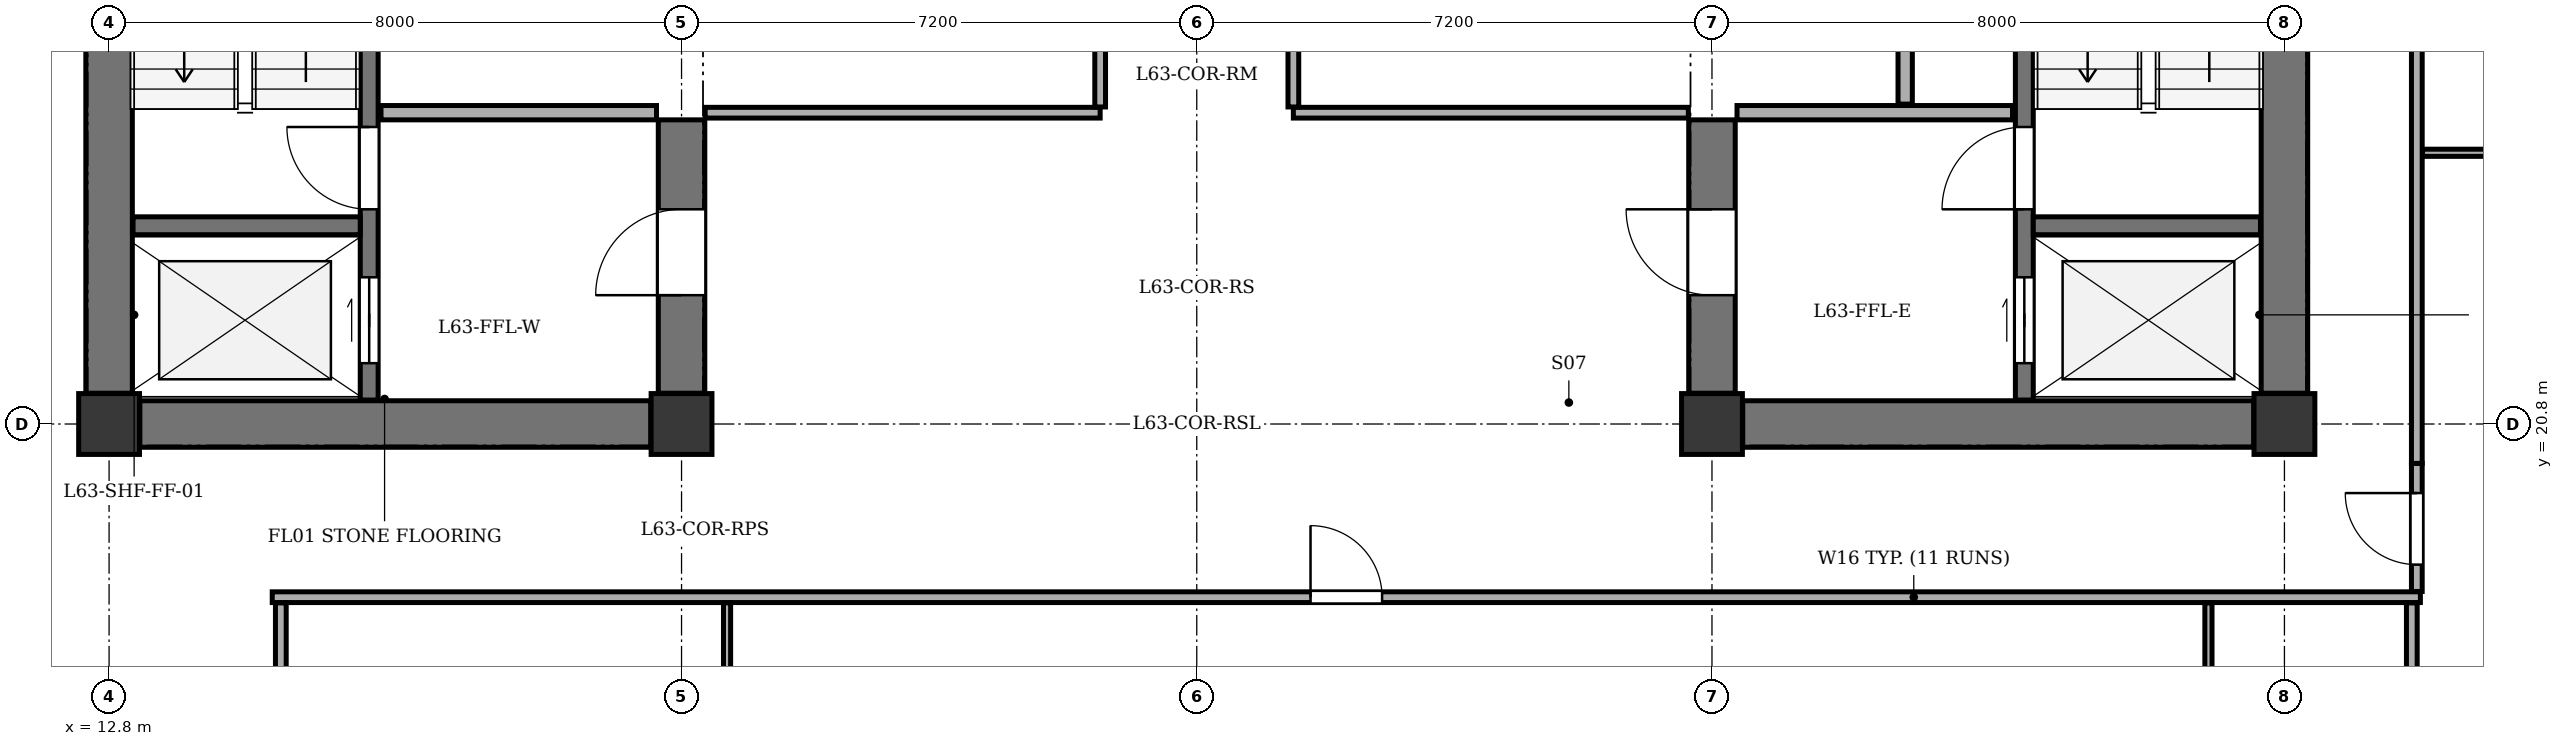
"""IFC4 building model, lengths in metres.
Left out: names, types, materials, properties, quantities, classifications, styles, units other than length and angle.
Written with IfcOpenShell. Run it as: python <this file> out.ifc"""

import sys

from ifc_helpers import new_model, si_unit, direction, frame, frame_2d, origin, origin_2d, place, context, subcontext, project, spatial, rectangle, extrude, element, fill, save


model = new_model("IFC4")
c1 = context("Model", 3, precision=1e-05, world=origin(), true_north=direction((0.0, 1.0)))
c2 = subcontext(c1, "Body", "Model", "MODEL_VIEW")
j1 = project(units=[si_unit("LENGTHUNIT", "METRE"), si_unit("PLANEANGLEUNIT", "RADIAN")], contexts=[c1])
p1 = place(None, origin())
s1 = spatial("IfcSite", under=j1, at=p1, CompositionType="ELEMENT")
p2 = place(p1, origin())
s2 = spatial("IfcBuilding", under=s1, at=p2, CompositionType="ELEMENT")
p3 = place(p2, frame((0.0, 0.0, 241.5)))
s3 = spatial("IfcBuildingStorey", under=s2, at=p3, CompositionType="ELEMENT", Elevation=241.5)
for number, where, z_axis, x_axis in (
    (1, (12.8, 20.8, 0.0), (0.0, 0.0, 1.0), (1.0, 0.0, 0.0)),
    (2, (20.8, 20.8, 0.0), (0.0, 0.0, 1.0), (1.0, 0.0, 0.0)),
    (3, (35.2, 20.8, 0.0), (0.0, 0.0, 1.0), (1.0, 0.0, 0.0)),
    (4, (43.2, 20.8, 0.0), (0.0, 0.0, 1.0), (1.0, 0.0, 0.0)),
):
    element("IfcColumn", number, at=place(p3, frame(where, z_axis=z_axis, x_axis=x_axis)), inside=s3, PredefinedType="COLUMN", context=c2, shape_type="SweptSolid", body=[
        extrude(rectangle(XDim=0.85, YDim=0.85, at=origin_2d()), origin(), (0.0, 0.0, 1.0), 3.4),
    ])
p4 = place(p3, frame((12.8, 21.23, 0.0), z_axis=(0.0, 0.0, 1.0), x_axis=(0.0, 1.0, 0.0)))
e5 = element("IfcWall", 5, at=p4, inside=s3, PredefinedType="SHEAR", context=c2, shape_type="SweptSolid", body=[
    extrude(rectangle(XDim=11.94, YDim=0.65, at=frame_2d((5.97, 0.0))), origin(), (0.0, 0.0, 1.0), 3.1),
])
p5 = place(p3, frame((13.23, 20.8, 0.0), z_axis=(0.0, 0.0, 1.0), x_axis=(1.0, 0.0, 0.0)))
e6 = element("IfcWall", 6, at=p5, inside=s3, PredefinedType="SHEAR", context=c2, shape_type="SweptSolid", body=[
    extrude(rectangle(XDim=7.14, YDim=0.65, at=frame_2d((3.57, 0.0))), origin(), (0.0, 0.0, 1.0), 3.1),
])
p6 = place(p3, frame((20.8, 21.23, 0.0), z_axis=(0.0, 0.0, 1.0), x_axis=(0.0, 1.0, 0.0)))
e7 = element("IfcWall", 7, at=p6, inside=s3, PredefinedType="SHEAR", context=c2, shape_type="SweptSolid", body=[
    extrude(rectangle(XDim=3.82, YDim=0.65, at=frame_2d((1.91, 0.0))), origin(), (0.0, 0.0, 1.0), 3.1),
])
p7 = place(p6, frame((1.37, 0.0, 0.0)))
e8 = element("IfcOpeningElement", 8, at=p7, cuts=e7, PredefinedType="OPENING", context=c2, shape_type="SweptSolid", body=[
    extrude(rectangle(XDim=1.2, YDim=2.15, at=frame_2d((0.6, 1.075))), frame((0.0, 0.335, 0.0), z_axis=(0.0, -1.0, 0.0), x_axis=(1.0, 0.0, 0.0)), (0.0, 0.0, 1.0), 0.67),
])
p8 = place(p3, frame((16.435, 21.135, 0.0), z_axis=(0.0, 0.0, 1.0), x_axis=(0.0, 1.0, 0.0)))
e9 = element("IfcWall", 9, at=p8, inside=s3, PredefinedType="SHEAR", context=c2, shape_type="SweptSolid", body=[
    extrude(rectangle(XDim=12.13, YDim=0.25, at=frame_2d((6.065, 0.0))), origin(), (0.0, 0.0, 1.0), 3.1),
])
p9 = place(p8, frame((0.515, 0.0, 0.0)))
e10 = element("IfcOpeningElement", 10, at=p9, cuts=e9, PredefinedType="OPENING", context=c2, shape_type="SweptSolid", body=[
    extrude(rectangle(XDim=1.2, YDim=2.15, at=frame_2d((0.6, 1.075))), frame((0.0, 0.135, 0.0), z_axis=(0.0, -1.0, 0.0), x_axis=(1.0, 0.0, 0.0)), (0.0, 0.0, 1.0), 0.27),
])
p10 = place(p8, frame((2.665, 0.0, 0.0)))
e11 = element("IfcOpeningElement", 11, at=p10, cuts=e9, PredefinedType="OPENING", context=c2, shape_type="SweptSolid", body=[
    extrude(rectangle(XDim=1.15, YDim=2.15, at=frame_2d((0.575, 1.075))), frame((0.0, 0.135, 0.0), z_axis=(0.0, -1.0, 0.0), x_axis=(1.0, 0.0, 0.0)), (0.0, 0.0, 1.0), 0.27),
])
p11 = place(p3, frame((13.135, 23.57, 0.0), z_axis=(0.0, 0.0, 1.0), x_axis=(1.0, 0.0, 0.0)))
e12 = element("IfcWall", 12, at=p11, inside=s3, PredefinedType="SHEAR", context=c2, shape_type="SweptSolid", body=[
    extrude(rectangle(XDim=3.175, YDim=0.25, at=frame_2d((1.587, 0.0))), origin(), (0.0, 0.0, 1.0), 3.1),
])
p12 = place(p3, frame((16.6, 25.15, 0.0), z_axis=(0.0, 0.0, 1.0), x_axis=(1.0, 0.0, 0.0)))
e13 = element("IfcWall", 13, at=p12, inside=s3, PredefinedType="SOLIDWALL", context=c2, shape_type="SweptSolid", body=[
    extrude(rectangle(XDim=3.85, YDim=0.2, at=frame_2d((1.925, 0.0))), origin(), (0.0, 0.0, 1.0), 3.1),
])
p13 = place(p3, frame((43.2, 21.23, 0.0), z_axis=(0.0, 0.0, 1.0), x_axis=(0.0, 1.0, 0.0)))
e14 = element("IfcWall", 14, at=p13, inside=s3, PredefinedType="SHEAR", context=c2, shape_type="SweptSolid", body=[
    extrude(rectangle(XDim=11.94, YDim=0.65, at=frame_2d((5.97, 0.0))), origin(), (0.0, 0.0, 1.0), 3.1),
])
p14 = place(p3, frame((35.63, 20.8, 0.0), z_axis=(0.0, 0.0, 1.0), x_axis=(1.0, 0.0, 0.0)))
e15 = element("IfcWall", 15, at=p14, inside=s3, PredefinedType="SHEAR", context=c2, shape_type="SweptSolid", body=[
    extrude(rectangle(XDim=7.14, YDim=0.65, at=frame_2d((3.57, 0.0))), origin(), (0.0, 0.0, 1.0), 3.1),
])
p15 = place(p3, frame((35.2, 21.23, 0.0), z_axis=(0.0, 0.0, 1.0), x_axis=(0.0, 1.0, 0.0)))
e16 = element("IfcWall", 16, at=p15, inside=s3, PredefinedType="SHEAR", context=c2, shape_type="SweptSolid", body=[
    extrude(rectangle(XDim=3.82, YDim=0.65, at=frame_2d((1.91, 0.0))), origin(), (0.0, 0.0, 1.0), 3.1),
])
p16 = place(p15, frame((1.37, 0.0, 0.0)))
e17 = element("IfcOpeningElement", 17, at=p16, cuts=e16, PredefinedType="OPENING", context=c2, shape_type="SweptSolid", body=[
    extrude(rectangle(XDim=1.2, YDim=2.15, at=frame_2d((0.6, 1.075))), frame((0.0, 0.335, 0.0), z_axis=(0.0, -1.0, 0.0), x_axis=(1.0, 0.0, 0.0)), (0.0, 0.0, 1.0), 0.67),
])
p17 = place(p3, frame((39.565, 21.135, 0.0), z_axis=(0.0, 0.0, 1.0), x_axis=(0.0, 1.0, 0.0)))
e18 = element("IfcWall", 18, at=p17, inside=s3, PredefinedType="SHEAR", context=c2, shape_type="SweptSolid", body=[
    extrude(rectangle(XDim=12.13, YDim=0.25, at=frame_2d((6.065, 0.0))), origin(), (0.0, 0.0, 1.0), 3.1),
])
p18 = place(p17, frame((0.515, 0.0, 0.0)))
e19 = element("IfcOpeningElement", 19, at=p18, cuts=e18, PredefinedType="OPENING", context=c2, shape_type="SweptSolid", body=[
    extrude(rectangle(XDim=1.2, YDim=2.15, at=frame_2d((0.6, 1.075))), frame((0.0, 0.135, 0.0), z_axis=(0.0, -1.0, 0.0), x_axis=(1.0, 0.0, 0.0)), (0.0, 0.0, 1.0), 0.27),
])
p19 = place(p17, frame((2.665, 0.0, 0.0)))
e20 = element("IfcOpeningElement", 20, at=p19, cuts=e18, PredefinedType="OPENING", context=c2, shape_type="SweptSolid", body=[
    extrude(rectangle(XDim=1.15, YDim=2.15, at=frame_2d((0.575, 1.075))), frame((0.0, 0.135, 0.0), z_axis=(0.0, -1.0, 0.0), x_axis=(1.0, 0.0, 0.0)), (0.0, 0.0, 1.0), 0.27),
])
p20 = place(p3, frame((39.69, 23.57, 0.0), z_axis=(0.0, 0.0, 1.0), x_axis=(1.0, 0.0, 0.0)))
e21 = element("IfcWall", 21, at=p20, inside=s3, PredefinedType="SHEAR", context=c2, shape_type="SweptSolid", body=[
    extrude(rectangle(XDim=3.175, YDim=0.25, at=frame_2d((1.587, 0.0))), origin(), (0.0, 0.0, 1.0), 3.1),
])
p21 = place(p3, frame((35.55, 25.15, 0.0), z_axis=(0.0, 0.0, 1.0), x_axis=(1.0, 0.0, 0.0)))
e22 = element("IfcWall", 22, at=p21, inside=s3, PredefinedType="SOLIDWALL", context=c2, shape_type="SweptSolid", body=[
    extrude(rectangle(XDim=3.85, YDim=0.2, at=frame_2d((1.925, 0.0))), origin(), (0.0, 0.0, 1.0), 3.1),
])
p22 = place(p3, frame((37.9, 25.27, 0.0), z_axis=(0.0, 0.0, 1.0), x_axis=(0.0, 1.0, 0.0)))
e23 = element("IfcWall", 23, at=p22, inside=s3, PredefinedType="SOLIDWALL", context=c2, shape_type="SweptSolid", body=[
    extrude(rectangle(XDim=7.995, YDim=0.2, at=frame_2d((3.998, 0.0))), origin(), (0.0, 0.0, 1.0), 3.1),
])
for number, where, z_axis, x_axis in (
    (24, (21.13, 25.15, 0.0), (0.0, 0.0, 1.0), (1.0, 0.0, 0.0)),
    (25, (29.35, 25.15, 0.0), (0.0, 0.0, 1.0), (1.0, 0.0, 0.0)),
):
    element("IfcWall", number, at=place(p3, frame(where, z_axis=z_axis, x_axis=x_axis)), inside=s3, PredefinedType="PARTITIONING", context=c2, shape_type="SweptSolid", body=[
        extrude(rectangle(XDim=5.52, YDim=0.15, at=frame_2d((2.76, 0.0))), origin(), (0.0, 0.0, 1.0), 3.1),
    ])
p23 = place(p3, frame((26.65, 25.23, 0.0), z_axis=(0.0, 0.0, 1.0), x_axis=(0.0, 1.0, 0.0)))
e26 = element("IfcWall", 26, at=p23, inside=s3, PredefinedType="PARTITIONING", context=c2, shape_type="SweptSolid", body=[
    extrude(rectangle(XDim=5.82, YDim=0.15, at=frame_2d((2.91, 0.0))), origin(), (0.0, 0.0, 1.0), 3.1),
])
p24 = place(p23, frame((2.72, 0.0, 0.0)))
e27 = element("IfcOpeningElement", 27, at=p24, cuts=e26, PredefinedType="OPENING", context=c2, shape_type="SweptSolid", body=[
    extrude(rectangle(XDim=1.0, YDim=2.1, at=frame_2d((0.5, 1.05))), frame((0.0, 0.085, 0.0), z_axis=(0.0, -1.0, 0.0), x_axis=(1.0, 0.0, 0.0)), (0.0, 0.0, 1.0), 0.17),
])
p25 = place(p3, frame((29.35, 25.23, 0.0), z_axis=(0.0, 0.0, 1.0), x_axis=(0.0, 1.0, 0.0)))
e28 = element("IfcWall", 28, at=p25, inside=s3, PredefinedType="PARTITIONING", context=c2, shape_type="SweptSolid", body=[
    extrude(rectangle(XDim=5.82, YDim=0.15, at=frame_2d((2.91, 0.0))), origin(), (0.0, 0.0, 1.0), 3.1),
])
p26 = place(p25, frame((2.72, 0.0, 0.0)))
e29 = element("IfcOpeningElement", 29, at=p26, cuts=e28, PredefinedType="OPENING", context=c2, shape_type="SweptSolid", body=[
    extrude(rectangle(XDim=1.0, YDim=2.1, at=frame_2d((0.5, 1.05))), frame((0.0, 0.085, 0.0), z_axis=(0.0, -1.0, 0.0), x_axis=(1.0, 0.0, 0.0)), (0.0, 0.0, 1.0), 0.17),
])
p27 = place(p3, frame((15.08, 18.38, 0.0), z_axis=(0.0, 0.0, 1.0), x_axis=(1.0, 0.0, 0.0)))
e30 = element("IfcWall", 30, at=p27, inside=s3, PredefinedType="PARTITIONING", context=c2, shape_type="SweptSolid", body=[
    extrude(rectangle(XDim=30.02, YDim=0.15, at=frame_2d((15.01, 0.0))), origin(), (0.0, 0.0, 1.0), 3.1),
])
p28 = place(p27, frame((14.51, 0.0, 0.0)))
e31 = element("IfcOpeningElement", 31, at=p28, cuts=e30, PredefinedType="OPENING", context=c2, shape_type="SweptSolid", body=[
    extrude(rectangle(XDim=1.0, YDim=2.1, at=frame_2d((0.5, 1.05))), frame((0.0, 0.085, 0.0), z_axis=(0.0, -1.0, 0.0), x_axis=(1.0, 0.0, 0.0)), (0.0, 0.0, 1.0), 0.17),
])
p29 = place(p3, frame((15.2, 3.045, 0.0), z_axis=(0.0, 0.0, 1.0), x_axis=(0.0, 1.0, 0.0)))
e32 = element("IfcWall", 32, at=p29, inside=s3, PredefinedType="PARTITIONING", context=c2, shape_type="SweptSolid", body=[
    extrude(rectangle(XDim=15.255, YDim=0.15, at=frame_2d((7.627, 0.0))), origin(), (0.0, 0.0, 1.0), 3.1),
])
p30 = place(p3, frame((42.138, 5.605, 0.0), z_axis=(0.0, 0.0, 1.0), x_axis=(0.0, 1.0, 0.0)))
e33 = element("IfcWall", 33, at=p30, inside=s3, PredefinedType="PARTITIONING", context=c2, shape_type="SweptSolid", body=[
    extrude(rectangle(XDim=12.695, YDim=0.1, at=frame_2d((6.348, 0.0))), origin(), (0.0, 0.0, 1.0), 2.725),
])
p31 = place(p30, frame((5.91, 0.0, 0.0)))
e34 = element("IfcOpeningElement", 34, at=p31, cuts=e33, PredefinedType="OPENING", context=c2, shape_type="SweptSolid", body=[
    extrude(rectangle(XDim=0.9, YDim=2.05, at=frame_2d((0.45, 1.025))), frame((0.0, 0.06, 0.0), z_axis=(0.0, -1.0, 0.0), x_axis=(1.0, 0.0, 0.0)), (0.0, 0.0, 1.0), 0.12),
])
p32 = place(p3, frame((21.436, 5.605, 0.0), z_axis=(0.0, 0.0, 1.0), x_axis=(0.0, 1.0, 0.0)))
e35 = element("IfcWall", 35, at=p32, inside=s3, PredefinedType="PARTITIONING", context=c2, shape_type="SweptSolid", body=[
    extrude(rectangle(XDim=12.695, YDim=0.1, at=frame_2d((6.348, 0.0))), origin(), (0.0, 0.0, 1.0), 3.1),
])
p33 = place(p32, frame((0.605, 0.0, 0.0)))
e36 = element("IfcOpeningElement", 36, at=p33, cuts=e35, PredefinedType="OPENING", context=c2, shape_type="SweptSolid", body=[
    extrude(rectangle(XDim=0.9, YDim=2.05, at=frame_2d((0.45, 1.025))), frame((0.0, 0.06, 0.0), z_axis=(0.0, -1.0, 0.0), x_axis=(1.0, 0.0, 0.0)), (0.0, 0.0, 1.0), 0.12),
])
p34 = place(p3, frame((44.98, 3.045, 0.0), z_axis=(0.0, 0.0, 1.0), x_axis=(0.0, 1.0, 0.0)))
e37 = element("IfcWall", 37, at=p34, inside=s3, PredefinedType="PARTITIONING", context=c2, shape_type="SweptSolid", body=[
    extrude(rectangle(XDim=15.255, YDim=0.15, at=frame_2d((7.627, 0.0))), origin(), (0.0, 0.0, 1.0), 2.725),
])
p35 = place(p3, frame((45.05, 18.46, 0.0), z_axis=(0.0, 0.0, 1.0), x_axis=(0.0, 1.0, 0.0)))
e38 = element("IfcWall", 38, at=p35, inside=s3, PredefinedType="PARTITIONING", context=c2, shape_type="SweptSolid", body=[
    extrude(rectangle(XDim=1.79, YDim=0.15, at=frame_2d((0.895, 0.0))), origin(), (0.0, 0.0, 1.0), 2.725),
])
p36 = place(p35, frame((0.375, 0.0, 0.0)))
e39 = element("IfcOpeningElement", 39, at=p36, cuts=e38, PredefinedType="OPENING", context=c2, shape_type="SweptSolid", body=[
    extrude(rectangle(XDim=1.0, YDim=2.1, at=frame_2d((0.5, 1.05))), frame((0.0, 0.085, 0.0), z_axis=(0.0, -1.0, 0.0), x_axis=(1.0, 0.0, 0.0)), (0.0, 0.0, 1.0), 0.17),
])
p37 = place(p3, frame((45.05, 20.25, 0.0), z_axis=(0.0, 0.0, 1.0), x_axis=(0.0, 1.0, 0.0)))
e40 = element("IfcWall", 40, at=p37, inside=s3, PredefinedType="PARTITIONING", context=c2, shape_type="SweptSolid", body=[
    extrude(rectangle(XDim=13.9, YDim=0.15, at=frame_2d((6.95, 0.0))), origin(), (0.0, 0.0, 1.0), 2.725),
])
p38 = place(p3, frame((45.13, 24.59, 0.0), z_axis=(0.0, 0.0, 1.0), x_axis=(1.0, 0.0, 0.0)))
e41 = element("IfcWall", 41, at=p38, inside=s3, PredefinedType="PARTITIONING", context=c2, shape_type="SweptSolid", body=[
    extrude(rectangle(XDim=10.225, YDim=0.1, at=frame_2d((5.113, 0.0))), origin(), (0.0, 0.0, 1.0), 3.1),
])
p39 = place(p38, frame((2.083, 0.0, 0.0)))
e42 = element("IfcOpeningElement", 42, at=p39, cuts=e41, PredefinedType="OPENING", context=c2, shape_type="SweptSolid", body=[
    extrude(rectangle(XDim=0.85, YDim=2.05, at=frame_2d((0.425, 1.025))), frame((0.0, 0.06, 0.0), z_axis=(0.0, -1.0, 0.0), x_axis=(1.0, 0.0, 0.0)), (0.0, 0.0, 1.0), 0.12),
])
p40 = place(p38, frame((7.078, 0.0, 0.0)))
e43 = element("IfcOpeningElement", 43, at=p40, cuts=e41, PredefinedType="OPENING", context=c2, shape_type="SweptSolid", body=[
    extrude(rectangle(XDim=0.85, YDim=2.05, at=frame_2d((0.425, 1.025))), frame((0.0, 0.06, 0.0), z_axis=(0.0, -1.0, 0.0), x_axis=(1.0, 0.0, 0.0)), (0.0, 0.0, 1.0), 0.12),
])
p41 = place(p7, origin())
e44 = element("IfcDoor", 44, at=p41, inside=s3, OperationType="SINGLE_SWING_LEFT", PredefinedType="DOOR", context=c2, shape_type="SweptSolid", body=[
    extrude(rectangle(XDim=1.2, YDim=2.15, at=frame_2d((0.6, 1.075))), frame((0.0, 0.025, 0.0), z_axis=(0.0, -1.0, 0.0), x_axis=(1.0, 0.0, 0.0)), (0.0, 0.0, 1.0), 0.05),
])
fill(e8, e44)
p42 = place(p9, origin())
e45 = element("IfcDoor", 45, at=p42, inside=s3, OperationType="DOUBLE_DOOR_SLIDING", PredefinedType="DOOR", context=c2, shape_type="SweptSolid", body=[
    extrude(rectangle(XDim=1.2, YDim=2.15, at=frame_2d((0.6, 1.075))), frame((0.0, 0.025, 0.0), z_axis=(0.0, -1.0, 0.0), x_axis=(1.0, 0.0, 0.0)), (0.0, 0.0, 1.0), 0.05),
])
fill(e10, e45)
p43 = place(p10, origin())
e46 = element("IfcDoor", 46, at=p43, inside=s3, OperationType="SINGLE_SWING_RIGHT", PredefinedType="DOOR", context=c2, shape_type="SweptSolid", body=[
    extrude(rectangle(XDim=1.15, YDim=2.15, at=frame_2d((0.575, 1.075))), frame((0.0, 0.025, 0.0), z_axis=(0.0, -1.0, 0.0), x_axis=(1.0, 0.0, 0.0)), (0.0, 0.0, 1.0), 0.05),
])
fill(e11, e46)
p44 = place(p16, origin())
e47 = element("IfcDoor", 47, at=p44, inside=s3, OperationType="SINGLE_SWING_RIGHT", PredefinedType="DOOR", context=c2, shape_type="SweptSolid", body=[
    extrude(rectangle(XDim=1.2, YDim=2.15, at=frame_2d((0.6, 1.075))), frame((0.0, 0.025, 0.0), z_axis=(0.0, -1.0, 0.0), x_axis=(1.0, 0.0, 0.0)), (0.0, 0.0, 1.0), 0.05),
])
fill(e17, e47)
p45 = place(p18, origin())
e48 = element("IfcDoor", 48, at=p45, inside=s3, OperationType="DOUBLE_DOOR_SLIDING", PredefinedType="DOOR", context=c2, shape_type="SweptSolid", body=[
    extrude(rectangle(XDim=1.2, YDim=2.15, at=frame_2d((0.6, 1.075))), frame((0.0, 0.025, 0.0), z_axis=(0.0, -1.0, 0.0), x_axis=(1.0, 0.0, 0.0)), (0.0, 0.0, 1.0), 0.05),
])
fill(e19, e48)
p46 = place(p19, origin())
e49 = element("IfcDoor", 49, at=p46, inside=s3, OperationType="SINGLE_SWING_LEFT", PredefinedType="DOOR", context=c2, shape_type="SweptSolid", body=[
    extrude(rectangle(XDim=1.15, YDim=2.15, at=frame_2d((0.575, 1.075))), frame((0.0, 0.025, 0.0), z_axis=(0.0, -1.0, 0.0), x_axis=(1.0, 0.0, 0.0)), (0.0, 0.0, 1.0), 0.05),
])
fill(e20, e49)
p47 = place(p28, origin())
e50 = element("IfcDoor", 50, at=p47, inside=s3, OperationType="SINGLE_SWING_LEFT", PredefinedType="DOOR", context=c2, shape_type="SweptSolid", body=[
    extrude(rectangle(XDim=1.0, YDim=2.1, at=frame_2d((0.5, 1.05))), frame((0.0, 0.025, 0.0), z_axis=(0.0, -1.0, 0.0), x_axis=(1.0, 0.0, 0.0)), (0.0, 0.0, 1.0), 0.05),
])
fill(e31, e50)
p48 = place(p36, origin())
e51 = element("IfcDoor", 51, at=p48, inside=s3, OperationType="SINGLE_SWING_RIGHT", PredefinedType="DOOR", context=c2, shape_type="SweptSolid", body=[
    extrude(rectangle(XDim=1.0, YDim=2.1, at=frame_2d((0.5, 1.05))), frame((0.0, 0.025, 0.0), z_axis=(0.0, -1.0, 0.0), x_axis=(1.0, 0.0, 0.0)), (0.0, 0.0, 1.0), 0.05),
])
fill(e39, e51)
save(model, sys.argv[1])
